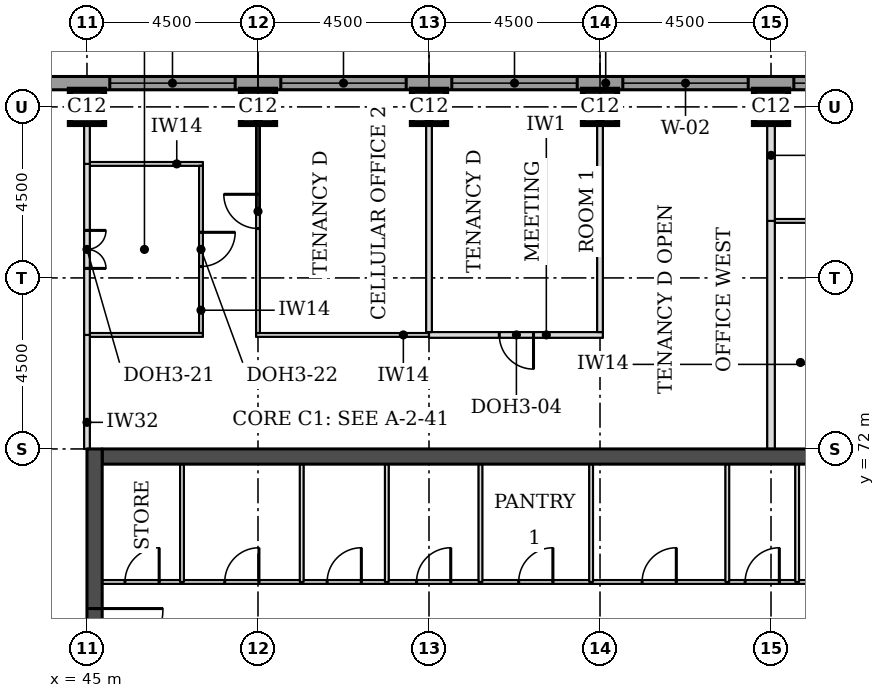
"""IFC4 building model, lengths in metres.
Left out: names, types, materials, properties, quantities, classifications, styles, units other than length and angle.
Written with IfcOpenShell. Run it as: python <this file> out.ifc"""

import sys

from ifc_helpers import new_model, si_unit, direction, frame, frame_2d, origin, origin_2d, place, context, subcontext, project, spatial, rectangle, extrude, element, fill, save


model = new_model("IFC4")
c1 = context("Model", 3, precision=1e-05, world=origin(), true_north=direction((0.0, 1.0)))
c2 = subcontext(c1, "Body", "Model", "MODEL_VIEW")
j1 = project(units=[si_unit("LENGTHUNIT", "METRE"), si_unit("PLANEANGLEUNIT", "RADIAN")], contexts=[c1])
p1 = place(None, origin())
s1 = spatial("IfcSite", under=j1, at=p1, CompositionType="ELEMENT")
p2 = place(p1, origin())
s2 = spatial("IfcBuilding", under=s1, at=p2, CompositionType="ELEMENT")
p3 = place(p2, frame((0.0, 0.0, 166.2)))
s3 = spatial("IfcBuildingStorey", under=s2, at=p3, CompositionType="ELEMENT", Elevation=166.2)
for number, where, z_axis, x_axis in (
    (1, (45.0, 81.0, 0.0), (0.0, 0.0, 1.0), (1.0, 0.0, 0.0)),
    (2, (49.5, 81.0, 0.0), (0.0, 0.0, 1.0), (1.0, 0.0, 0.0)),
    (3, (54.0, 81.0, 0.0), (0.0, 0.0, 1.0), (1.0, 0.0, 0.0)),
    (4, (58.5, 81.0, 0.0), (0.0, 0.0, 1.0), (1.0, 0.0, 0.0)),
    (5, (63.0, 81.0, 0.0), (0.0, 0.0, 1.0), (1.0, 0.0, 0.0)),
):
    element("IfcColumn", number, at=place(p3, frame(where, z_axis=z_axis, x_axis=x_axis)), inside=s3, PredefinedType="COLUMN", context=c2, shape_type="SweptSolid", body=[
        extrude(rectangle(XDim=0.9, YDim=0.9, at=origin_2d()), origin(), (0.0, 0.0, 1.0), 3.7),
    ])
p4 = place(p3, frame((45.4, 71.8, 0.0), z_axis=(0.0, 0.0, 1.0), x_axis=(1.0, 0.0, 0.0)))
e6 = element("IfcWall", 6, at=p4, inside=s3, PredefinedType="SHEAR", context=c2, shape_type="SweptSolid", body=[
    extrude(rectangle(XDim=21.7, YDim=0.4, at=frame_2d((10.85, 0.0))), origin(), (0.0, 0.0, 1.0), 3.7),
])
p5 = place(p3, frame((45.2, 49.5, 0.0), z_axis=(0.0, 0.0, 1.0), x_axis=(0.0, 1.0, 0.0)))
e7 = element("IfcWall", 7, at=p5, inside=s3, PredefinedType="SHEAR", context=c2, shape_type="SweptSolid", body=[
    extrude(rectangle(XDim=22.5, YDim=0.4, at=frame_2d((11.25, 0.0))), origin(), (0.0, 0.0, 1.0), 3.7),
])
p6 = place(p5, frame((4.2, 0.0, 0.0)))
e8 = element("IfcOpeningElement", 8, at=p6, cuts=e7, PredefinedType="OPENING", context=c2, shape_type="SweptSolid", body=[
    extrude(rectangle(XDim=1.8, YDim=2.1, at=frame_2d((0.9, 1.05))), frame((0.0, 0.21, 0.0), z_axis=(0.0, -1.0, 0.0), x_axis=(1.0, 0.0, 0.0)), (0.0, 0.0, 1.0), 0.42),
])
p7 = place(p5, frame((6.9, 0.0, 0.0)))
e9 = element("IfcOpeningElement", 9, at=p7, cuts=e7, PredefinedType="OPENING", context=c2, shape_type="SweptSolid", body=[
    extrude(rectangle(XDim=1.1, YDim=2.1, at=frame_2d((0.55, 1.05))), frame((0.0, 0.21, 0.0), z_axis=(0.0, -1.0, 0.0), x_axis=(1.0, 0.0, 0.0)), (0.0, 0.0, 1.0), 0.42),
])
p8 = place(p5, frame((13.6, 0.0, 0.0)))
e10 = element("IfcOpeningElement", 10, at=p8, cuts=e7, PredefinedType="OPENING", context=c2, shape_type="SweptSolid", body=[
    extrude(rectangle(XDim=1.1, YDim=2.1, at=frame_2d((0.55, 1.05))), frame((0.0, 0.21, 0.0), z_axis=(0.0, -1.0, 0.0), x_axis=(1.0, 0.0, 0.0)), (0.0, 0.0, 1.0), 0.42),
])
p9 = place(p5, frame((16.5, 0.0, 0.0)))
e11 = element("IfcOpeningElement", 11, at=p9, cuts=e7, PredefinedType="OPENING", context=c2, shape_type="SweptSolid", body=[
    extrude(rectangle(XDim=1.8, YDim=2.1, at=frame_2d((0.9, 1.05))), frame((0.0, 0.21, 0.0), z_axis=(0.0, -1.0, 0.0), x_axis=(1.0, 0.0, 0.0)), (0.0, 0.0, 1.0), 0.42),
])
p10 = place(p3, frame((72.331, 81.625, 0.0), z_axis=(0.0, 0.0, 1.0), x_axis=(-1.0, 0.0, 0.0)))
e12 = element("IfcWall", 12, at=p10, inside=s3, PredefinedType="STANDARD", context=c2, shape_type="SweptSolid", body=[
    extrude(rectangle(XDim=32.163, YDim=0.35, at=frame_2d((16.081, 0.0))), origin(), (0.0, 0.0, 1.0), 3.525),
])
p11 = place(p10, frame((5.431, 0.0, 0.9)))
e13 = element("IfcOpeningElement", 13, at=p11, cuts=e12, PredefinedType="OPENING", context=c2, shape_type="SweptSolid", body=[
    extrude(rectangle(XDim=3.3, YDim=1.9, at=frame_2d((1.65, 0.95))), frame((0.0, 0.185, 0.0), z_axis=(0.0, -1.0, 0.0), x_axis=(1.0, 0.0, 0.0)), (0.0, 0.0, 1.0), 0.37),
])
p12 = place(p10, frame((9.931, 0.0, 0.9)))
e14 = element("IfcOpeningElement", 14, at=p12, cuts=e12, PredefinedType="OPENING", context=c2, shape_type="SweptSolid", body=[
    extrude(rectangle(XDim=3.3, YDim=1.9, at=frame_2d((1.65, 0.95))), frame((0.0, 0.185, 0.0), z_axis=(0.0, -1.0, 0.0), x_axis=(1.0, 0.0, 0.0)), (0.0, 0.0, 1.0), 0.37),
])
p13 = place(p10, frame((14.431, 0.0, 0.9)))
e15 = element("IfcOpeningElement", 15, at=p13, cuts=e12, PredefinedType="OPENING", context=c2, shape_type="SweptSolid", body=[
    extrude(rectangle(XDim=3.3, YDim=1.9, at=frame_2d((1.65, 0.95))), frame((0.0, 0.185, 0.0), z_axis=(0.0, -1.0, 0.0), x_axis=(1.0, 0.0, 0.0)), (0.0, 0.0, 1.0), 0.37),
])
p14 = place(p10, frame((18.931, 0.0, 0.9)))
e16 = element("IfcOpeningElement", 16, at=p14, cuts=e12, PredefinedType="OPENING", context=c2, shape_type="SweptSolid", body=[
    extrude(rectangle(XDim=3.3, YDim=1.9, at=frame_2d((1.65, 0.95))), frame((0.0, 0.185, 0.0), z_axis=(0.0, -1.0, 0.0), x_axis=(1.0, 0.0, 0.0)), (0.0, 0.0, 1.0), 0.37),
])
p15 = place(p10, frame((23.431, 0.0, 0.9)))
e17 = element("IfcOpeningElement", 17, at=p15, cuts=e12, PredefinedType="OPENING", context=c2, shape_type="SweptSolid", body=[
    extrude(rectangle(XDim=3.3, YDim=1.9, at=frame_2d((1.65, 0.95))), frame((0.0, 0.185, 0.0), z_axis=(0.0, -1.0, 0.0), x_axis=(1.0, 0.0, 0.0)), (0.0, 0.0, 1.0), 0.37),
])
p16 = place(p3, frame((45.075, 75.0, 0.0), z_axis=(0.0, 0.0, 1.0), x_axis=(1.0, 0.0, 0.0)))
e18 = element("IfcWall", 18, at=p16, inside=s3, PredefinedType="PARTITIONING", context=c2, shape_type="SweptSolid", body=[
    extrude(rectangle(XDim=2.975, YDim=0.1, at=frame_2d((1.488, 0.0))), origin(), (0.0, 0.0, 1.0), 3.55),
])
p17 = place(p3, frame((49.45, 75.0, 0.0), z_axis=(0.0, 0.0, 1.0), x_axis=(1.0, 0.0, 0.0)))
e19 = element("IfcWall", 19, at=p17, inside=s3, PredefinedType="PARTITIONING", context=c2, shape_type="SweptSolid", body=[
    extrude(rectangle(XDim=4.55, YDim=0.1, at=frame_2d((2.275, 0.0))), origin(), (0.0, 0.0, 1.0), 3.55),
])
p18 = place(p3, frame((54.0, 75.0, 0.0), z_axis=(0.0, 0.0, 1.0), x_axis=(1.0, 0.0, 0.0)))
e20 = element("IfcWall", 20, at=p18, inside=s3, PredefinedType="PARTITIONING", context=c2, shape_type="SweptSolid", body=[
    extrude(rectangle(XDim=4.575, YDim=0.15, at=frame_2d((2.288, 0.0))), origin(), (0.0, 0.0, 1.0), 3.55),
])
p19 = place(p18, frame((1.85, 0.0, 0.0)))
e21 = element("IfcOpeningElement", 21, at=p19, cuts=e20, PredefinedType="OPENING", context=c2, shape_type="SweptSolid", body=[
    extrude(rectangle(XDim=0.9, YDim=2.1, at=frame_2d((0.45, 1.05))), frame((0.0, 0.085, 0.0), z_axis=(0.0, -1.0, 0.0), x_axis=(1.0, 0.0, 0.0)), (0.0, 0.0, 1.0), 0.17),
])
p20 = place(p3, frame((63.1, 78.0, 0.0), z_axis=(0.0, 0.0, 1.0), x_axis=(1.0, 0.0, 0.0)))
e22 = element("IfcWall", 22, at=p20, inside=s3, PredefinedType="PARTITIONING", context=c2, shape_type="SweptSolid", body=[
    extrude(rectangle(XDim=4.325, YDim=0.1, at=frame_2d((2.163, 0.0))), origin(), (0.0, 0.0, 1.0), 3.55),
])
p21 = place(p20, frame((1.45, 0.0, 0.0)))
e23 = element("IfcOpeningElement", 23, at=p21, cuts=e22, PredefinedType="OPENING", context=c2, shape_type="SweptSolid", body=[
    extrude(rectangle(XDim=0.9, YDim=2.1, at=frame_2d((0.45, 1.05))), frame((0.0, 0.06, 0.0), z_axis=(0.0, -1.0, 0.0), x_axis=(1.0, 0.0, 0.0)), (0.0, 0.0, 1.0), 0.12),
])
p22 = place(p3, frame((45.075, 79.5, 0.0), z_axis=(0.0, 0.0, 1.0), x_axis=(1.0, 0.0, 0.0)))
e24 = element("IfcWall", 24, at=p22, inside=s3, PredefinedType="PARTITIONING", context=c2, shape_type="SweptSolid", body=[
    extrude(rectangle(XDim=2.975, YDim=0.1, at=frame_2d((1.488, 0.0))), origin(), (0.0, 0.0, 1.0), 3.55),
])
p23 = place(p3, frame((45.0, 72.0, 0.0), z_axis=(0.0, 0.0, 1.0), x_axis=(0.0, 1.0, 0.0)))
e25 = element("IfcWall", 25, at=p23, inside=s3, PredefinedType="PARTITIONING", context=c2, shape_type="SweptSolid", body=[
    extrude(rectangle(XDim=3.0, YDim=0.15, at=frame_2d((1.5, 0.0))), origin(), (0.0, 0.0, 1.0), 3.022),
])
p24 = place(p3, frame((63.0, 72.0, 0.0), z_axis=(0.0, 0.0, 1.0), x_axis=(0.0, 1.0, 0.0)))
e26 = element("IfcWall", 26, at=p24, inside=s3, PredefinedType="PARTITIONING", context=c2, shape_type="SweptSolid", body=[
    extrude(rectangle(XDim=6.0, YDim=0.2, at=frame_2d((3.0, 0.0))), origin(), (0.0, 0.0, 1.0), 3.55),
])
p25 = place(p3, frame((45.0, 75.0, 0.0), z_axis=(0.0, 0.0, 1.0), x_axis=(0.0, 1.0, 0.0)))
e27 = element("IfcWall", 27, at=p25, inside=s3, PredefinedType="PARTITIONING", context=c2, shape_type="SweptSolid", body=[
    extrude(rectangle(XDim=4.5, YDim=0.15, at=frame_2d((2.25, 0.0))), origin(), (0.0, 0.0, 1.0), 3.022),
])
p26 = place(p25, frame((1.75, 0.0, 0.0)))
e28 = element("IfcOpeningElement", 28, at=p26, cuts=e27, PredefinedType="OPENING", context=c2, shape_type="SweptSolid", body=[
    extrude(rectangle(XDim=1.0, YDim=2.1, at=frame_2d((0.5, 1.05))), frame((0.0, 0.085, 0.0), z_axis=(0.0, -1.0, 0.0), x_axis=(1.0, 0.0, 0.0)), (0.0, 0.0, 1.0), 0.17),
])
p27 = place(p3, frame((48.0, 75.05, 0.0), z_axis=(0.0, 0.0, 1.0), x_axis=(0.0, 1.0, 0.0)))
e29 = element("IfcWall", 29, at=p27, inside=s3, PredefinedType="PARTITIONING", context=c2, shape_type="SweptSolid", body=[
    extrude(rectangle(XDim=4.4, YDim=0.1, at=frame_2d((2.2, 0.0))), origin(), (0.0, 0.0, 1.0), 3.55),
])
p28 = place(p27, frame((1.75, 0.0, 0.0)))
e30 = element("IfcOpeningElement", 30, at=p28, cuts=e29, PredefinedType="OPENING", context=c2, shape_type="SweptSolid", body=[
    extrude(rectangle(XDim=0.9, YDim=2.1, at=frame_2d((0.45, 1.05))), frame((0.0, 0.06, 0.0), z_axis=(0.0, -1.0, 0.0), x_axis=(1.0, 0.0, 0.0)), (0.0, 0.0, 1.0), 0.12),
])
p29 = place(p3, frame((49.5, 75.05, 0.0), z_axis=(0.0, 0.0, 1.0), x_axis=(0.0, 1.0, 0.0)))
e31 = element("IfcWall", 31, at=p29, inside=s3, PredefinedType="PARTITIONING", context=c2, shape_type="SweptSolid", body=[
    extrude(rectangle(XDim=6.4, YDim=0.1, at=frame_2d((3.2, 0.0))), origin(), (0.0, 0.0, 1.0), 3.55),
])
p30 = place(p29, frame((2.75, 0.0, 0.0)))
e32 = element("IfcOpeningElement", 32, at=p30, cuts=e31, PredefinedType="OPENING", context=c2, shape_type="SweptSolid", body=[
    extrude(rectangle(XDim=0.9, YDim=2.1, at=frame_2d((0.45, 1.05))), frame((0.0, 0.06, 0.0), z_axis=(0.0, -1.0, 0.0), x_axis=(1.0, 0.0, 0.0)), (0.0, 0.0, 1.0), 0.12),
])
for number, where, z_axis, x_axis in (
    (33, (54.0, 75.075, 0.0), (0.0, 0.0, 1.0), (0.0, 1.0, 0.0)),
    (34, (58.5, 75.075, 0.0), (0.0, 0.0, 1.0), (0.0, 1.0, 0.0)),
):
    element("IfcWall", number, at=place(p3, frame(where, z_axis=z_axis, x_axis=x_axis)), inside=s3, PredefinedType="PARTITIONING", context=c2, shape_type="SweptSolid", body=[
        extrude(rectangle(XDim=6.375, YDim=0.15, at=frame_2d((3.188, 0.0))), origin(), (0.0, 0.0, 1.0), 3.55),
    ])
p31 = place(p3, frame((63.0, 78.0, 0.0), z_axis=(0.0, 0.0, 1.0), x_axis=(0.0, 1.0, 0.0)))
e35 = element("IfcWall", 35, at=p31, inside=s3, PredefinedType="PARTITIONING", context=c2, shape_type="SweptSolid", body=[
    extrude(rectangle(XDim=3.45, YDim=0.2, at=frame_2d((1.725, 0.0))), origin(), (0.0, 0.0, 1.0), 3.55),
])
p32 = place(p3, frame((45.0, 79.5, 0.0), z_axis=(0.0, 0.0, 1.0), x_axis=(0.0, 1.0, 0.0)))
e36 = element("IfcWall", 36, at=p32, inside=s3, PredefinedType="PARTITIONING", context=c2, shape_type="SweptSolid", body=[
    extrude(rectangle(XDim=1.95, YDim=0.15, at=frame_2d((0.975, 0.0))), origin(), (0.0, 0.0, 1.0), 3.022),
])
p33 = place(p3, frame((45.4, 68.5, 0.0), z_axis=(0.0, 0.0, 1.0), x_axis=(1.0, 0.0, 0.0)))
e37 = element("IfcWall", 37, at=p33, inside=s3, PredefinedType="PARTITIONING", context=c2, shape_type="SweptSolid", body=[
    extrude(rectangle(XDim=21.7, YDim=0.1, at=frame_2d((10.85, 0.0))), origin(), (0.0, 0.0, 1.0), 3.55),
])
p34 = place(p33, frame((19.544, 0.0, 0.0)))
e38 = element("IfcOpeningElement", 38, at=p34, cuts=e37, PredefinedType="OPENING", context=c2, shape_type="SweptSolid", body=[
    extrude(rectangle(XDim=0.9, YDim=2.1, at=frame_2d((0.45, 1.05))), frame((0.0, 0.06, 0.0), z_axis=(0.0, -1.0, 0.0), x_axis=(1.0, 0.0, 0.0)), (0.0, 0.0, 1.0), 0.12),
])
p35 = place(p33, frame((16.919, 0.0, 0.0)))
e39 = element("IfcOpeningElement", 39, at=p35, cuts=e37, PredefinedType="OPENING", context=c2, shape_type="SweptSolid", body=[
    extrude(rectangle(XDim=0.9, YDim=2.1, at=frame_2d((0.45, 1.05))), frame((0.0, 0.06, 0.0), z_axis=(0.0, -1.0, 0.0), x_axis=(1.0, 0.0, 0.0)), (0.0, 0.0, 1.0), 0.12),
])
p36 = place(p33, frame((0.6, 0.0, 0.0)))
e40 = element("IfcOpeningElement", 40, at=p36, cuts=e37, PredefinedType="OPENING", context=c2, shape_type="SweptSolid", body=[
    extrude(rectangle(XDim=0.9, YDim=2.1, at=frame_2d((0.45, 1.05))), frame((0.0, 0.06, 0.0), z_axis=(0.0, -1.0, 0.0), x_axis=(1.0, 0.0, 0.0)), (0.0, 0.0, 1.0), 0.12),
])
p37 = place(p33, frame((3.225, 0.0, 0.0)))
e41 = element("IfcOpeningElement", 41, at=p37, cuts=e37, PredefinedType="OPENING", context=c2, shape_type="SweptSolid", body=[
    extrude(rectangle(XDim=0.9, YDim=2.1, at=frame_2d((0.45, 1.05))), frame((0.0, 0.06, 0.0), z_axis=(0.0, -1.0, 0.0), x_axis=(1.0, 0.0, 0.0)), (0.0, 0.0, 1.0), 0.12),
])
p38 = place(p33, frame((14.208, 0.0, 0.0)))
e42 = element("IfcOpeningElement", 42, at=p38, cuts=e37, PredefinedType="OPENING", context=c2, shape_type="SweptSolid", body=[
    extrude(rectangle(XDim=0.9, YDim=2.1, at=frame_2d((0.45, 1.05))), frame((0.0, 0.06, 0.0), z_axis=(0.0, -1.0, 0.0), x_axis=(1.0, 0.0, 0.0)), (0.0, 0.0, 1.0), 0.12),
])
p39 = place(p33, frame((10.96, 0.0, 0.0)))
e43 = element("IfcOpeningElement", 43, at=p39, cuts=e37, PredefinedType="OPENING", context=c2, shape_type="SweptSolid", body=[
    extrude(rectangle(XDim=0.9, YDim=2.1, at=frame_2d((0.45, 1.05))), frame((0.0, 0.06, 0.0), z_axis=(0.0, -1.0, 0.0), x_axis=(1.0, 0.0, 0.0)), (0.0, 0.0, 1.0), 0.12),
])
p40 = place(p33, frame((8.272, 0.0, 0.0)))
e44 = element("IfcOpeningElement", 44, at=p40, cuts=e37, PredefinedType="OPENING", context=c2, shape_type="SweptSolid", body=[
    extrude(rectangle(XDim=0.9, YDim=2.1, at=frame_2d((0.45, 1.05))), frame((0.0, 0.06, 0.0), z_axis=(0.0, -1.0, 0.0), x_axis=(1.0, 0.0, 0.0)), (0.0, 0.0, 1.0), 0.12),
])
p41 = place(p33, frame((5.92, 0.0, 0.0)))
e45 = element("IfcOpeningElement", 45, at=p41, cuts=e37, PredefinedType="OPENING", context=c2, shape_type="SweptSolid", body=[
    extrude(rectangle(XDim=0.9, YDim=2.1, at=frame_2d((0.45, 1.05))), frame((0.0, 0.06, 0.0), z_axis=(0.0, -1.0, 0.0), x_axis=(1.0, 0.0, 0.0)), (0.0, 0.0, 1.0), 0.12),
])
for number, where, z_axis, x_axis in (
    (46, (47.5, 68.5, 0.0), (0.0, 0.0, 1.0), (0.0, 1.0, 0.0)),
    (47, (50.65, 68.5, 0.0), (0.0, 0.0, 1.0), (0.0, 1.0, 0.0)),
    (48, (52.89, 68.5, 0.0), (0.0, 0.0, 1.0), (0.0, 1.0, 0.0)),
    (49, (55.354, 68.5, 0.0), (0.0, 0.0, 1.0), (0.0, 1.0, 0.0)),
    (50, (58.266, 68.5, 0.0), (0.0, 0.0, 1.0), (0.0, 1.0, 0.0)),
    (51, (61.85, 68.5, 0.0), (0.0, 0.0, 1.0), (0.0, 1.0, 0.0)),
    (52, (63.688, 68.5, 0.0), (0.0, 0.0, 1.0), (0.0, 1.0, 0.0)),
):
    element("IfcWall", number, at=place(p3, frame(where, z_axis=z_axis, x_axis=x_axis)), inside=s3, PredefinedType="PARTITIONING", context=c2, shape_type="SweptSolid", body=[
        extrude(rectangle(XDim=3.1, YDim=0.1, at=frame_2d((1.55, 0.0))), origin(), (0.0, 0.0, 1.0), 3.55),
    ])
p42 = place(p11, origin())
e53 = element("IfcWindow", 53, at=p42, inside=s3, PartitioningType="SINGLE_PANEL", PredefinedType="WINDOW", context=c2, shape_type="SweptSolid", body=[
    extrude(rectangle(XDim=3.3, YDim=1.9, at=frame_2d((1.65, 0.95))), frame((0.0, 0.085, 0.0), z_axis=(0.0, -1.0, 0.0), x_axis=(1.0, 0.0, 0.0)), (0.0, 0.0, 1.0), 0.06),
])
fill(e13, e53)
p43 = place(p12, origin())
e54 = element("IfcWindow", 54, at=p43, inside=s3, PartitioningType="SINGLE_PANEL", PredefinedType="WINDOW", context=c2, shape_type="SweptSolid", body=[
    extrude(rectangle(XDim=3.3, YDim=1.9, at=frame_2d((1.65, 0.95))), frame((0.0, 0.085, 0.0), z_axis=(0.0, -1.0, 0.0), x_axis=(1.0, 0.0, 0.0)), (0.0, 0.0, 1.0), 0.06),
])
fill(e14, e54)
p44 = place(p13, origin())
e55 = element("IfcWindow", 55, at=p44, inside=s3, PartitioningType="SINGLE_PANEL", PredefinedType="WINDOW", context=c2, shape_type="SweptSolid", body=[
    extrude(rectangle(XDim=3.3, YDim=1.9, at=frame_2d((1.65, 0.95))), frame((0.0, 0.085, 0.0), z_axis=(0.0, -1.0, 0.0), x_axis=(1.0, 0.0, 0.0)), (0.0, 0.0, 1.0), 0.06),
])
fill(e15, e55)
p45 = place(p14, origin())
e56 = element("IfcWindow", 56, at=p45, inside=s3, PartitioningType="SINGLE_PANEL", PredefinedType="WINDOW", context=c2, shape_type="SweptSolid", body=[
    extrude(rectangle(XDim=3.3, YDim=1.9, at=frame_2d((1.65, 0.95))), frame((0.0, 0.085, 0.0), z_axis=(0.0, -1.0, 0.0), x_axis=(1.0, 0.0, 0.0)), (0.0, 0.0, 1.0), 0.06),
])
fill(e16, e56)
p46 = place(p15, origin())
e57 = element("IfcWindow", 57, at=p46, inside=s3, PartitioningType="SINGLE_PANEL", PredefinedType="WINDOW", context=c2, shape_type="SweptSolid", body=[
    extrude(rectangle(XDim=3.3, YDim=1.9, at=frame_2d((1.65, 0.95))), frame((0.0, 0.085, 0.0), z_axis=(0.0, -1.0, 0.0), x_axis=(1.0, 0.0, 0.0)), (0.0, 0.0, 1.0), 0.06),
])
fill(e17, e57)
p47 = place(p26, frame((1.0, 0.0, 0.0), z_axis=(0.0, 0.0, 1.0), x_axis=(-1.0, 0.0, 0.0)))
e58 = element("IfcDoor", 58, at=p47, inside=s3, OperationType="DOUBLE_DOOR_SINGLE_SWING", PredefinedType="DOOR", context=c2, shape_type="SweptSolid", body=[
    extrude(rectangle(XDim=1.0, YDim=2.1, at=frame_2d((0.5, 1.05))), frame((0.0, 0.025, 0.0), z_axis=(0.0, -1.0, 0.0), x_axis=(1.0, 0.0, 0.0)), (0.0, 0.0, 1.0), 0.05),
])
fill(e28, e58)
p48 = place(p28, frame((0.9, 0.0, 0.0), z_axis=(0.0, 0.0, 1.0), x_axis=(-1.0, 0.0, 0.0)))
e59 = element("IfcDoor", 59, at=p48, inside=s3, OperationType="SINGLE_SWING_LEFT", PredefinedType="DOOR", context=c2, shape_type="SweptSolid", body=[
    extrude(rectangle(XDim=0.9, YDim=2.1, at=frame_2d((0.45, 1.05))), frame((0.0, 0.025, 0.0), z_axis=(0.0, -1.0, 0.0), x_axis=(1.0, 0.0, 0.0)), (0.0, 0.0, 1.0), 0.05),
])
fill(e30, e59)
p49 = place(p30, origin())
e60 = element("IfcDoor", 60, at=p49, inside=s3, OperationType="SINGLE_SWING_RIGHT", PredefinedType="DOOR", context=c2, shape_type="SweptSolid", body=[
    extrude(rectangle(XDim=0.9, YDim=2.1, at=frame_2d((0.45, 1.05))), frame((0.0, 0.025, 0.0), z_axis=(0.0, -1.0, 0.0), x_axis=(1.0, 0.0, 0.0)), (0.0, 0.0, 1.0), 0.05),
])
fill(e32, e60)
p50 = place(p19, frame((0.9, 0.0, 0.0), z_axis=(0.0, 0.0, 1.0), x_axis=(-1.0, 0.0, 0.0)))
e61 = element("IfcDoor", 61, at=p50, inside=s3, OperationType="SINGLE_SWING_LEFT", PredefinedType="DOOR", context=c2, shape_type="SweptSolid", body=[
    extrude(rectangle(XDim=0.9, YDim=2.1, at=frame_2d((0.45, 1.05))), frame((0.0, 0.025, 0.0), z_axis=(0.0, -1.0, 0.0), x_axis=(1.0, 0.0, 0.0)), (0.0, 0.0, 1.0), 0.05),
])
fill(e21, e61)
p51 = place(p9, frame((1.8, 0.0, 0.0), z_axis=(0.0, 0.0, 1.0), x_axis=(-1.0, 0.0, 0.0)))
e62 = element("IfcDoor", 62, at=p51, inside=s3, OperationType="SINGLE_SWING_LEFT", PredefinedType="DOOR", context=c2, shape_type="SweptSolid", body=[
    extrude(rectangle(XDim=1.8, YDim=2.1, at=frame_2d((0.9, 1.05))), frame((0.0, 0.025, 0.0), z_axis=(0.0, -1.0, 0.0), x_axis=(1.0, 0.0, 0.0)), (0.0, 0.0, 1.0), 0.05),
])
fill(e11, e62)
p52 = place(p35, origin())
e63 = element("IfcDoor", 63, at=p52, inside=s3, OperationType="SINGLE_SWING_RIGHT", PredefinedType="DOOR", context=c2, shape_type="SweptSolid", body=[
    extrude(rectangle(XDim=0.9, YDim=2.1, at=frame_2d((0.45, 1.05))), frame((0.0, 0.025, 0.0), z_axis=(0.0, -1.0, 0.0), x_axis=(1.0, 0.0, 0.0)), (0.0, 0.0, 1.0), 0.05),
])
fill(e39, e63)
p53 = place(p36, origin())
e64 = element("IfcDoor", 64, at=p53, inside=s3, OperationType="SINGLE_SWING_RIGHT", PredefinedType="DOOR", context=c2, shape_type="SweptSolid", body=[
    extrude(rectangle(XDim=0.9, YDim=2.1, at=frame_2d((0.45, 1.05))), frame((0.0, 0.025, 0.0), z_axis=(0.0, -1.0, 0.0), x_axis=(1.0, 0.0, 0.0)), (0.0, 0.0, 1.0), 0.05),
])
fill(e40, e64)
p54 = place(p37, origin())
e65 = element("IfcDoor", 65, at=p54, inside=s3, OperationType="SINGLE_SWING_RIGHT", PredefinedType="DOOR", context=c2, shape_type="SweptSolid", body=[
    extrude(rectangle(XDim=0.9, YDim=2.1, at=frame_2d((0.45, 1.05))), frame((0.0, 0.025, 0.0), z_axis=(0.0, -1.0, 0.0), x_axis=(1.0, 0.0, 0.0)), (0.0, 0.0, 1.0), 0.05),
])
fill(e41, e65)
p55 = place(p38, origin())
e66 = element("IfcDoor", 66, at=p55, inside=s3, OperationType="SINGLE_SWING_RIGHT", PredefinedType="DOOR", context=c2, shape_type="SweptSolid", body=[
    extrude(rectangle(XDim=0.9, YDim=2.1, at=frame_2d((0.45, 1.05))), frame((0.0, 0.025, 0.0), z_axis=(0.0, -1.0, 0.0), x_axis=(1.0, 0.0, 0.0)), (0.0, 0.0, 1.0), 0.05),
])
fill(e42, e66)
p56 = place(p39, origin())
e67 = element("IfcDoor", 67, at=p56, inside=s3, OperationType="SINGLE_SWING_RIGHT", PredefinedType="DOOR", context=c2, shape_type="SweptSolid", body=[
    extrude(rectangle(XDim=0.9, YDim=2.1, at=frame_2d((0.45, 1.05))), frame((0.0, 0.025, 0.0), z_axis=(0.0, -1.0, 0.0), x_axis=(1.0, 0.0, 0.0)), (0.0, 0.0, 1.0), 0.05),
])
fill(e43, e67)
p57 = place(p40, origin())
e68 = element("IfcDoor", 68, at=p57, inside=s3, OperationType="SINGLE_SWING_RIGHT", PredefinedType="DOOR", context=c2, shape_type="SweptSolid", body=[
    extrude(rectangle(XDim=0.9, YDim=2.1, at=frame_2d((0.45, 1.05))), frame((0.0, 0.025, 0.0), z_axis=(0.0, -1.0, 0.0), x_axis=(1.0, 0.0, 0.0)), (0.0, 0.0, 1.0), 0.05),
])
fill(e44, e68)
p58 = place(p41, origin())
e69 = element("IfcDoor", 69, at=p58, inside=s3, OperationType="SINGLE_SWING_RIGHT", PredefinedType="DOOR", context=c2, shape_type="SweptSolid", body=[
    extrude(rectangle(XDim=0.9, YDim=2.1, at=frame_2d((0.45, 1.05))), frame((0.0, 0.025, 0.0), z_axis=(0.0, -1.0, 0.0), x_axis=(1.0, 0.0, 0.0)), (0.0, 0.0, 1.0), 0.05),
])
fill(e45, e69)
save(model, sys.argv[1])
